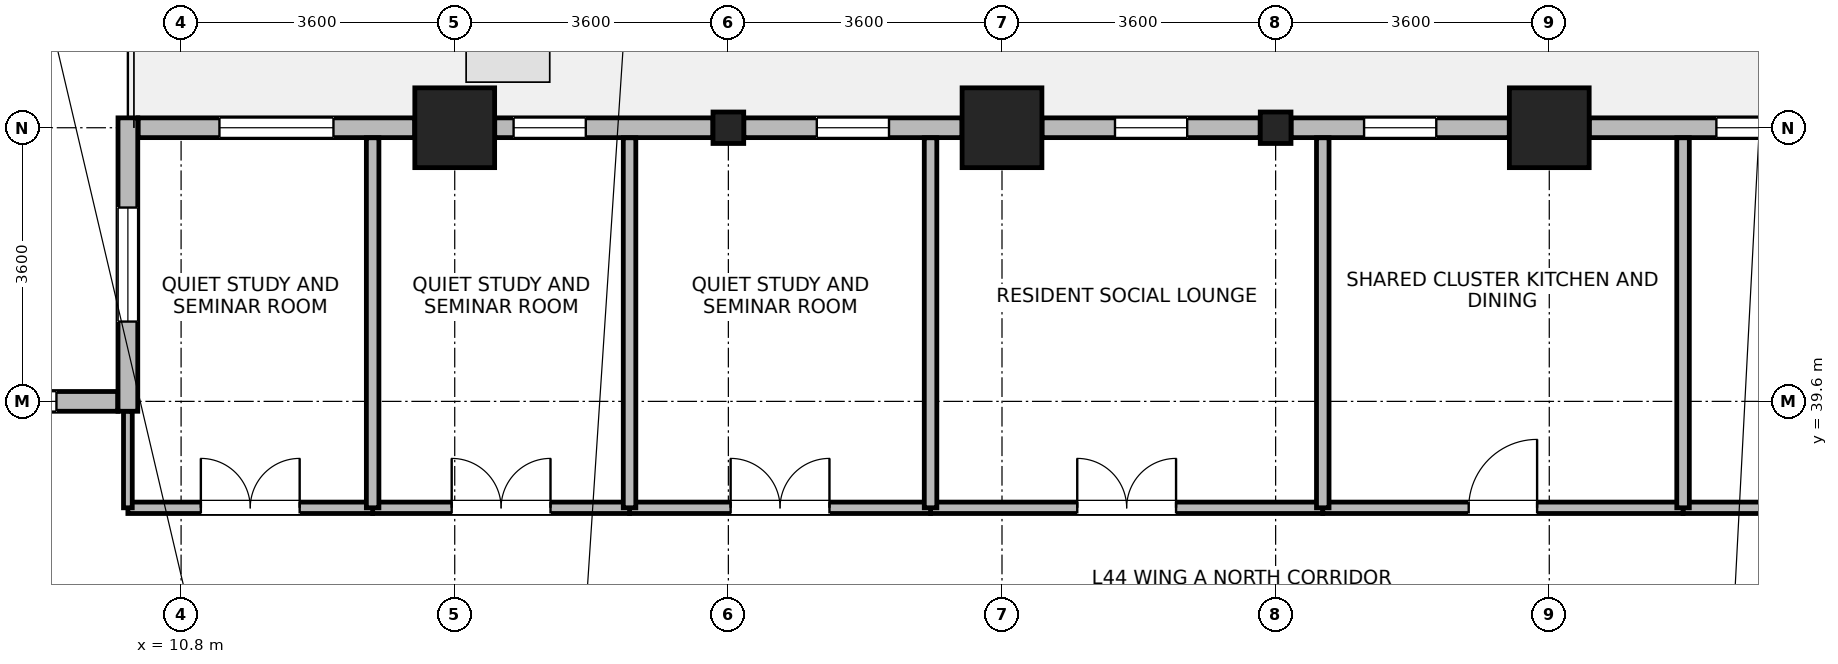
"""IFC4 building model, lengths in metres.
Left out: names, types, materials, properties, quantities, classifications, styles, units other than length and angle.
Written with IfcOpenShell. Run it as: python <this file> out.ifc"""

import sys

from ifc_helpers import new_model, si_unit, direction, frame, frame_2d, origin, origin_2d, place, context, subcontext, project, spatial, rectangle, i_section, extrude, source, transform, mapped, element, fill, save


model = new_model("IFC4")
c1 = context("Model", 3, precision=1e-05, world=origin(), true_north=direction((0.0, 1.0)))
c2 = subcontext(c1, "Body", "Model", "MODEL_VIEW")
j1 = project(units=[si_unit("LENGTHUNIT", "METRE"), si_unit("PLANEANGLEUNIT", "RADIAN")], contexts=[c1])
p1 = place(None, origin())
s1 = spatial("IfcSite", under=j1, at=p1, CompositionType="ELEMENT")
p2 = place(p1, origin())
s2 = spatial("IfcBuilding", under=s1, at=p2, CompositionType="ELEMENT")
p3 = place(p2, frame((0.0, 0.0, 173.5)))
s3 = spatial("IfcBuildingStorey", under=s2, at=p3, CompositionType="ELEMENT", Elevation=173.5)
m1 = source(origin(), c2, "Body", "SweptSolid", [
    extrude(rectangle(XDim=1.05, YDim=1.05, at=origin_2d()), origin(), (0.0, 0.0, 1.0), 3.7),
])
for number, where, z_axis, x_axis in (
    (1, (14.4, 43.2, 0.0), (0.0, 0.0, 1.0), (1.0, 0.0, 0.0)),
    (2, (21.6, 43.2, 0.0), (0.0, 0.0, 1.0), (1.0, 0.0, 0.0)),
    (3, (28.8, 43.2, 0.0), (0.0, 0.0, 1.0), (1.0, 0.0, 0.0)),
):
    element("IfcColumn", number, at=place(p3, frame(where, z_axis=z_axis, x_axis=x_axis)), inside=s3, PredefinedType="COLUMN", context=c2, shape_type="MappedRepresentation", body=[
        mapped(m1, transform((0.0, 0.0, 0.0), x_axis=(1.0, 0.0, 0.0), y_axis=(0.0, 1.0, 0.0), z_axis=(0.0, 0.0, 1.0), scale=1.0)),
    ])
m2 = source(origin(), c2, "Body", "SweptSolid", [
    extrude(i_section(OverallWidth=0.404, OverallDepth=0.414, WebThickness=0.021, FlangeThickness=0.028, FilletRadius=0.015, at=origin_2d()), origin(), (0.0, 0.0, 1.0), 3.7),
])
for number, where, z_axis, x_axis in (
    (4, (18.0, 43.2, 0.0), (0.0, 0.0, 1.0), (1.0, 0.0, 0.0)),
    (5, (25.2, 43.2, 0.0), (0.0, 0.0, 1.0), (1.0, 0.0, 0.0)),
):
    element("IfcColumn", number, at=place(p3, frame(where, z_axis=z_axis, x_axis=x_axis)), inside=s3, PredefinedType="COLUMN", context=c2, shape_type="MappedRepresentation", body=[
        mapped(m2, transform((0.0, 0.0, 0.0), x_axis=(1.0, 0.0, 0.0), y_axis=(0.0, 1.0, 0.0), z_axis=(0.0, 0.0, 1.0), scale=1.0)),
    ])
p4 = place(p3, frame((29.326, 43.2, 0.0), z_axis=(0.0, 0.0, 1.0), x_axis=(1.0, 0.0, 0.0)))
e6 = element("IfcWall", 6, at=p4, inside=s3, PredefinedType="STANDARD", context=c2, shape_type="SweptSolid", body=[
    extrude(rectangle(XDim=2.871, YDim=0.26, at=frame_2d((1.436, 0.0))), origin(), (0.0, 0.0, 1.0), 2.99),
])
p5 = place(p4, frame((1.673, 0.0, 0.85)))
e7 = element("IfcOpeningElement", 7, at=p5, cuts=e6, PredefinedType="OPENING", context=c2, shape_type="SweptSolid", body=[
    extrude(rectangle(XDim=0.95, YDim=1.75, at=frame_2d((0.475, 0.875))), frame((0.0, 0.14, 0.0), z_axis=(0.0, -1.0, 0.0), x_axis=(1.0, 0.0, 0.0)), (0.0, 0.0, 1.0), 0.28),
])
p6 = place(p3, frame((25.403, 43.2, 0.0), z_axis=(0.0, 0.0, 1.0), x_axis=(1.0, 0.0, 0.0)))
e8 = element("IfcWall", 8, at=p6, inside=s3, PredefinedType="STANDARD", context=c2, shape_type="SweptSolid", body=[
    extrude(rectangle(XDim=2.871, YDim=0.26, at=frame_2d((1.436, 0.0))), origin(), (0.0, 0.0, 1.0), 2.99),
])
p7 = place(p6, frame((0.96, 0.0, 0.85)))
e9 = element("IfcOpeningElement", 9, at=p7, cuts=e8, PredefinedType="OPENING", context=c2, shape_type="SweptSolid", body=[
    extrude(rectangle(XDim=0.95, YDim=1.75, at=frame_2d((0.475, 0.875))), frame((0.0, 0.14, 0.0), z_axis=(0.0, -1.0, 0.0), x_axis=(1.0, 0.0, 0.0)), (0.0, 0.0, 1.0), 0.28),
])
p8 = place(p3, frame((22.126, 43.2, 0.0), z_axis=(0.0, 0.0, 1.0), x_axis=(1.0, 0.0, 0.0)))
e10 = element("IfcWall", 10, at=p8, inside=s3, PredefinedType="STANDARD", context=c2, shape_type="SweptSolid", body=[
    extrude(rectangle(XDim=2.871, YDim=0.26, at=frame_2d((1.436, 0.0))), origin(), (0.0, 0.0, 1.0), 2.99),
])
p9 = place(p8, frame((0.96, 0.0, 0.85)))
e11 = element("IfcOpeningElement", 11, at=p9, cuts=e10, PredefinedType="OPENING", context=c2, shape_type="SweptSolid", body=[
    extrude(rectangle(XDim=0.95, YDim=1.75, at=frame_2d((0.475, 0.875))), frame((0.0, 0.14, 0.0), z_axis=(0.0, -1.0, 0.0), x_axis=(1.0, 0.0, 0.0)), (0.0, 0.0, 1.0), 0.28),
])
p10 = place(p3, frame((18.203, 43.2, 0.0), z_axis=(0.0, 0.0, 1.0), x_axis=(1.0, 0.0, 0.0)))
e12 = element("IfcWall", 12, at=p10, inside=s3, PredefinedType="STANDARD", context=c2, shape_type="SweptSolid", body=[
    extrude(rectangle(XDim=2.871, YDim=0.26, at=frame_2d((1.436, 0.0))), origin(), (0.0, 0.0, 1.0), 2.99),
])
p11 = place(p10, frame((0.96, 0.0, 0.85)))
e13 = element("IfcOpeningElement", 13, at=p11, cuts=e12, PredefinedType="OPENING", context=c2, shape_type="SweptSolid", body=[
    extrude(rectangle(XDim=0.95, YDim=1.75, at=frame_2d((0.475, 0.875))), frame((0.0, 0.14, 0.0), z_axis=(0.0, -1.0, 0.0), x_axis=(1.0, 0.0, 0.0)), (0.0, 0.0, 1.0), 0.28),
])
p12 = place(p3, frame((14.926, 43.2, 0.0), z_axis=(0.0, 0.0, 1.0), x_axis=(1.0, 0.0, 0.0)))
e14 = element("IfcWall", 14, at=p12, inside=s3, PredefinedType="STANDARD", context=c2, shape_type="SweptSolid", body=[
    extrude(rectangle(XDim=2.871, YDim=0.26, at=frame_2d((1.436, 0.0))), origin(), (0.0, 0.0, 1.0), 2.99),
])
p13 = place(p12, frame((0.249, 0.0, 0.85)))
e15 = element("IfcOpeningElement", 15, at=p13, cuts=e14, PredefinedType="OPENING", context=c2, shape_type="SweptSolid", body=[
    extrude(rectangle(XDim=0.95, YDim=1.75, at=frame_2d((0.475, 0.875))), frame((0.0, 0.14, 0.0), z_axis=(0.0, -1.0, 0.0), x_axis=(1.0, 0.0, 0.0)), (0.0, 0.0, 1.0), 0.28),
])
p14 = place(p3, frame((10.235, 43.2, 0.0), z_axis=(0.0, 0.0, 1.0), x_axis=(1.0, 0.0, 0.0)))
e16 = element("IfcWall", 16, at=p14, inside=s3, PredefinedType="STANDARD", context=c2, shape_type="SweptSolid", body=[
    extrude(rectangle(XDim=3.639, YDim=0.26, at=frame_2d((1.819, 0.0))), origin(), (0.0, 0.0, 1.0), 3.44),
])
p15 = place(p14, frame((1.07, 0.0, 0.85)))
e17 = element("IfcOpeningElement", 17, at=p15, cuts=e16, PredefinedType="OPENING", context=c2, shape_type="SweptSolid", body=[
    extrude(rectangle(XDim=1.5, YDim=1.85, at=frame_2d((0.75, 0.925))), frame((0.0, 0.14, 0.0), z_axis=(0.0, -1.0, 0.0), x_axis=(1.0, 0.0, 0.0)), (0.0, 0.0, 1.0), 0.28),
])
p16 = place(p3, frame((10.1, 39.47, 0.0), z_axis=(0.0, 0.0, 1.0), x_axis=(0.0, 1.0, 0.0)))
e18 = element("IfcWall", 18, at=p16, inside=s3, PredefinedType="STANDARD", context=c2, shape_type="SweptSolid", body=[
    extrude(rectangle(XDim=3.86, YDim=0.26, at=frame_2d((1.93, 0.0))), origin(), (0.0, 0.0, 1.0), 3.44),
])
p17 = place(p16, frame((1.18, 0.0, 0.85)))
e19 = element("IfcOpeningElement", 19, at=p17, cuts=e18, PredefinedType="OPENING", context=c2, shape_type="SweptSolid", body=[
    extrude(rectangle(XDim=1.5, YDim=1.85, at=frame_2d((0.75, 0.925))), frame((0.0, 0.14, 0.0), z_axis=(0.0, -1.0, 0.0), x_axis=(1.0, 0.0, 0.0)), (0.0, 0.0, 1.0), 0.28),
])
p18 = place(p3, frame((0.635, 39.6, 0.0), z_axis=(0.0, 0.0, 1.0), x_axis=(1.0, 0.0, 0.0)))
e20 = element("IfcWall", 20, at=p18, inside=s3, PredefinedType="STANDARD", context=c2, shape_type="SweptSolid", body=[
    extrude(rectangle(XDim=9.33, YDim=0.26, at=frame_2d((4.665, 0.0))), origin(), (0.0, 0.0, 1.0), 3.44),
])
p19 = place(p18, frame((0.805, 0.0, 0.85)))
e21 = element("IfcOpeningElement", 21, at=p19, cuts=e20, PredefinedType="OPENING", context=c2, shape_type="SweptSolid", body=[
    extrude(rectangle(XDim=1.5, YDim=1.85, at=frame_2d((0.75, 0.925))), frame((0.0, 0.14, 0.0), z_axis=(0.0, -1.0, 0.0), x_axis=(1.0, 0.0, 0.0)), (0.0, 0.0, 1.0), 0.28),
])
p20 = place(p18, frame((3.915, 0.0, 0.85)))
e22 = element("IfcOpeningElement", 22, at=p20, cuts=e20, PredefinedType="OPENING", context=c2, shape_type="SweptSolid", body=[
    extrude(rectangle(XDim=1.5, YDim=1.85, at=frame_2d((0.75, 0.925))), frame((0.0, 0.14, 0.0), z_axis=(0.0, -1.0, 0.0), x_axis=(1.0, 0.0, 0.0)), (0.0, 0.0, 1.0), 0.28),
])
p21 = place(p18, frame((7.025, 0.0, 0.85)))
e23 = element("IfcOpeningElement", 23, at=p21, cuts=e20, PredefinedType="OPENING", context=c2, shape_type="SweptSolid", body=[
    extrude(rectangle(XDim=1.5, YDim=1.85, at=frame_2d((0.75, 0.925))), frame((0.0, 0.14, 0.0), z_axis=(0.0, -1.0, 0.0), x_axis=(1.0, 0.0, 0.0)), (0.0, 0.0, 1.0), 0.28),
])
p22 = place(p3, frame((20.66, 38.2, 0.0), z_axis=(0.0, 0.0, 1.0), x_axis=(1.0, 0.0, 0.0)))
e24 = element("IfcWall", 24, at=p22, inside=s3, PredefinedType="PARTITIONING", context=c2, shape_type="SweptSolid", body=[
    extrude(rectangle(XDim=5.16, YDim=0.15, at=frame_2d((2.58, 0.0))), origin(), (0.0, 0.0, 1.0), 3.44),
])
p23 = place(p22, frame((1.93, 0.0, 0.0)))
e25 = element("IfcOpeningElement", 25, at=p23, cuts=e24, PredefinedType="OPENING", context=c2, shape_type="SweptSolid", body=[
    extrude(rectangle(XDim=1.3, YDim=2.12, at=frame_2d((0.65, 1.06))), frame((0.0, 0.085, 0.0), z_axis=(0.0, -1.0, 0.0), x_axis=(1.0, 0.0, 0.0)), (0.0, 0.0, 1.0), 0.17),
])
p24 = place(p3, frame((30.56, 38.2, 0.0), z_axis=(0.0, 0.0, 1.0), x_axis=(1.0, 0.0, 0.0)))
e26 = element("IfcWall", 26, at=p24, inside=s3, PredefinedType="PARTITIONING", context=c2, shape_type="SweptSolid", body=[
    extrude(rectangle(XDim=4.8, YDim=0.15, at=frame_2d((2.4, 0.0))), origin(), (0.0, 0.0, 1.0), 3.44),
])
p25 = place(p24, frame((1.75, 0.0, 0.0)))
e27 = element("IfcOpeningElement", 27, at=p25, cuts=e26, PredefinedType="OPENING", context=c2, shape_type="SweptSolid", body=[
    extrude(rectangle(XDim=1.3, YDim=2.12, at=frame_2d((0.65, 1.06))), frame((0.0, 0.085, 0.0), z_axis=(0.0, -1.0, 0.0), x_axis=(1.0, 0.0, 0.0)), (0.0, 0.0, 1.0), 0.17),
])
p26 = place(p3, frame((25.82, 38.2, 0.0), z_axis=(0.0, 0.0, 1.0), x_axis=(1.0, 0.0, 0.0)))
e28 = element("IfcWall", 28, at=p26, inside=s3, PredefinedType="PARTITIONING", context=c2, shape_type="SweptSolid", body=[
    extrude(rectangle(XDim=4.74, YDim=0.15, at=frame_2d((2.37, 0.0))), origin(), (0.0, 0.0, 1.0), 3.44),
])
p27 = place(p26, frame((1.92, 0.0, 0.0)))
e29 = element("IfcOpeningElement", 29, at=p27, cuts=e28, PredefinedType="OPENING", context=c2, shape_type="SweptSolid", body=[
    extrude(rectangle(XDim=0.9, YDim=2.08, at=frame_2d((0.45, 1.04))), frame((0.0, 0.085, 0.0), z_axis=(0.0, -1.0, 0.0), x_axis=(1.0, 0.0, 0.0)), (0.0, 0.0, 1.0), 0.17),
])
p28 = place(p3, frame((16.7, 38.2, 0.0), z_axis=(0.0, 0.0, 1.0), x_axis=(1.0, 0.0, 0.0)))
e30 = element("IfcWall", 30, at=p28, inside=s3, PredefinedType="PARTITIONING", context=c2, shape_type="SweptSolid", body=[
    extrude(rectangle(XDim=3.96, YDim=0.15, at=frame_2d((1.98, 0.0))), origin(), (0.0, 0.0, 1.0), 3.44),
])
p29 = place(p28, frame((1.33, 0.0, 0.0)))
e31 = element("IfcOpeningElement", 31, at=p29, cuts=e30, PredefinedType="OPENING", context=c2, shape_type="SweptSolid", body=[
    extrude(rectangle(XDim=1.3, YDim=2.12, at=frame_2d((0.65, 1.06))), frame((0.0, 0.085, 0.0), z_axis=(0.0, -1.0, 0.0), x_axis=(1.0, 0.0, 0.0)), (0.0, 0.0, 1.0), 0.17),
])
p30 = place(p3, frame((13.32, 38.2, 0.0), z_axis=(0.0, 0.0, 1.0), x_axis=(1.0, 0.0, 0.0)))
e32 = element("IfcWall", 32, at=p30, inside=s3, PredefinedType="PARTITIONING", context=c2, shape_type="SweptSolid", body=[
    extrude(rectangle(XDim=3.38, YDim=0.15, at=frame_2d((1.69, 0.0))), origin(), (0.0, 0.0, 1.0), 3.44),
])
p31 = place(p30, frame((1.04, 0.0, 0.0)))
e33 = element("IfcOpeningElement", 33, at=p31, cuts=e32, PredefinedType="OPENING", context=c2, shape_type="SweptSolid", body=[
    extrude(rectangle(XDim=1.3, YDim=2.12, at=frame_2d((0.65, 1.06))), frame((0.0, 0.085, 0.0), z_axis=(0.0, -1.0, 0.0), x_axis=(1.0, 0.0, 0.0)), (0.0, 0.0, 1.0), 0.17),
])
p32 = place(p3, frame((10.1, 38.2, 0.0), z_axis=(0.0, 0.0, 1.0), x_axis=(1.0, 0.0, 0.0)))
e34 = element("IfcWall", 34, at=p32, inside=s3, PredefinedType="PARTITIONING", context=c2, shape_type="SweptSolid", body=[
    extrude(rectangle(XDim=3.22, YDim=0.15, at=frame_2d((1.61, 0.0))), origin(), (0.0, 0.0, 1.0), 3.44),
])
p33 = place(p32, frame((0.96, 0.0, 0.0)))
e35 = element("IfcOpeningElement", 35, at=p33, cuts=e34, PredefinedType="OPENING", context=c2, shape_type="SweptSolid", body=[
    extrude(rectangle(XDim=1.3, YDim=2.12, at=frame_2d((0.65, 1.06))), frame((0.0, 0.085, 0.0), z_axis=(0.0, -1.0, 0.0), x_axis=(1.0, 0.0, 0.0)), (0.0, 0.0, 1.0), 0.17),
])
p34 = place(p3, frame((10.1, 38.2, 0.0), z_axis=(0.0, 0.0, 1.0), x_axis=(0.0, 1.0, 0.0)))
e36 = element("IfcWall", 36, at=p34, inside=s3, PredefinedType="PARTITIONING", context=c2, shape_type="SweptSolid", body=[
    extrude(rectangle(XDim=1.268, YDim=0.115, at=frame_2d((0.634, 0.0))), origin(), (0.0, 0.0, 1.0), 3.44),
])
for number, where, z_axis, x_axis in (
    (37, (13.32, 38.2, 0.0), (0.0, 0.0, 1.0), (0.0, 1.0, 0.0)),
    (38, (16.7, 38.2, 0.0), (0.0, 0.0, 1.0), (0.0, 1.0, 0.0)),
    (39, (20.66, 38.2, 0.0), (0.0, 0.0, 1.0), (0.0, 1.0, 0.0)),
    (40, (25.82, 38.2, 0.0), (0.0, 0.0, 1.0), (0.0, 1.0, 0.0)),
    (41, (30.56, 38.2, 0.0), (0.0, 0.0, 1.0), (0.0, 1.0, 0.0)),
):
    element("IfcWall", number, at=place(p3, frame(where, z_axis=z_axis, x_axis=x_axis)), inside=s3, PredefinedType="PARTITIONING", context=c2, shape_type="SweptSolid", body=[
        extrude(rectangle(XDim=4.868, YDim=0.165, at=frame_2d((2.434, 0.0))), origin(), (0.0, 0.0, 1.0), 3.44),
    ])
p35 = place(p5, origin())
e42 = element("IfcWindow", 42, at=p35, inside=s3, PartitioningType="SINGLE_PANEL", PredefinedType="WINDOW", context=c2, shape_type="SweptSolid", body=[
    extrude(rectangle(XDim=0.95, YDim=1.75, at=frame_2d((0.475, 0.875))), frame((0.0, 0.03, 0.0), z_axis=(0.0, -1.0, 0.0), x_axis=(1.0, 0.0, 0.0)), (0.0, 0.0, 1.0), 0.06),
])
fill(e7, e42)
p36 = place(p7, origin())
e43 = element("IfcWindow", 43, at=p36, inside=s3, PartitioningType="SINGLE_PANEL", PredefinedType="WINDOW", context=c2, shape_type="SweptSolid", body=[
    extrude(rectangle(XDim=0.95, YDim=1.75, at=frame_2d((0.475, 0.875))), frame((0.0, 0.03, 0.0), z_axis=(0.0, -1.0, 0.0), x_axis=(1.0, 0.0, 0.0)), (0.0, 0.0, 1.0), 0.06),
])
fill(e9, e43)
p37 = place(p9, origin())
e44 = element("IfcWindow", 44, at=p37, inside=s3, PartitioningType="SINGLE_PANEL", PredefinedType="WINDOW", context=c2, shape_type="SweptSolid", body=[
    extrude(rectangle(XDim=0.95, YDim=1.75, at=frame_2d((0.475, 0.875))), frame((0.0, 0.03, 0.0), z_axis=(0.0, -1.0, 0.0), x_axis=(1.0, 0.0, 0.0)), (0.0, 0.0, 1.0), 0.06),
])
fill(e11, e44)
p38 = place(p11, origin())
e45 = element("IfcWindow", 45, at=p38, inside=s3, PartitioningType="SINGLE_PANEL", PredefinedType="WINDOW", context=c2, shape_type="SweptSolid", body=[
    extrude(rectangle(XDim=0.95, YDim=1.75, at=frame_2d((0.475, 0.875))), frame((0.0, 0.03, 0.0), z_axis=(0.0, -1.0, 0.0), x_axis=(1.0, 0.0, 0.0)), (0.0, 0.0, 1.0), 0.06),
])
fill(e13, e45)
p39 = place(p13, origin())
e46 = element("IfcWindow", 46, at=p39, inside=s3, PartitioningType="SINGLE_PANEL", PredefinedType="WINDOW", context=c2, shape_type="SweptSolid", body=[
    extrude(rectangle(XDim=0.95, YDim=1.75, at=frame_2d((0.475, 0.875))), frame((0.0, 0.03, 0.0), z_axis=(0.0, -1.0, 0.0), x_axis=(1.0, 0.0, 0.0)), (0.0, 0.0, 1.0), 0.06),
])
fill(e15, e46)
p40 = place(p15, origin())
e47 = element("IfcWindow", 47, at=p40, inside=s3, PartitioningType="SINGLE_PANEL", PredefinedType="WINDOW", context=c2, shape_type="SweptSolid", body=[
    extrude(rectangle(XDim=1.5, YDim=1.85, at=frame_2d((0.75, 0.925))), frame((0.0, 0.03, 0.0), z_axis=(0.0, -1.0, 0.0), x_axis=(1.0, 0.0, 0.0)), (0.0, 0.0, 1.0), 0.06),
])
fill(e17, e47)
p41 = place(p17, origin())
e48 = element("IfcWindow", 48, at=p41, inside=s3, PartitioningType="SINGLE_PANEL", PredefinedType="WINDOW", context=c2, shape_type="SweptSolid", body=[
    extrude(rectangle(XDim=1.5, YDim=1.85, at=frame_2d((0.75, 0.925))), frame((0.0, 0.03, 0.0), z_axis=(0.0, -1.0, 0.0), x_axis=(1.0, 0.0, 0.0)), (0.0, 0.0, 1.0), 0.06),
])
fill(e19, e48)
p42 = place(p21, origin())
e49 = element("IfcWindow", 49, at=p42, inside=s3, PartitioningType="SINGLE_PANEL", PredefinedType="WINDOW", context=c2, shape_type="SweptSolid", body=[
    extrude(rectangle(XDim=1.5, YDim=1.85, at=frame_2d((0.75, 0.925))), frame((0.0, 0.03, 0.0), z_axis=(0.0, -1.0, 0.0), x_axis=(1.0, 0.0, 0.0)), (0.0, 0.0, 1.0), 0.06),
])
fill(e23, e49)
p43 = place(p23, origin())
e50 = element("IfcDoor", 50, at=p43, inside=s3, OperationType="DOUBLE_DOOR_SINGLE_SWING", PredefinedType="DOOR", context=c2, shape_type="SweptSolid", body=[
    extrude(rectangle(XDim=1.3, YDim=2.12, at=frame_2d((0.65, 1.06))), frame((0.0, 0.025, 0.0), z_axis=(0.0, -1.0, 0.0), x_axis=(1.0, 0.0, 0.0)), (0.0, 0.0, 1.0), 0.05),
])
fill(e25, e50)
p44 = place(p27, origin())
e51 = element("IfcDoor", 51, at=p44, inside=s3, OperationType="SINGLE_SWING_RIGHT", PredefinedType="DOOR", context=c2, shape_type="SweptSolid", body=[
    extrude(rectangle(XDim=0.9, YDim=2.08, at=frame_2d((0.45, 1.04))), frame((0.0, 0.025, 0.0), z_axis=(0.0, -1.0, 0.0), x_axis=(1.0, 0.0, 0.0)), (0.0, 0.0, 1.0), 0.05),
])
fill(e29, e51)
p45 = place(p29, origin())
e52 = element("IfcDoor", 52, at=p45, inside=s3, OperationType="DOUBLE_DOOR_SINGLE_SWING", PredefinedType="DOOR", context=c2, shape_type="SweptSolid", body=[
    extrude(rectangle(XDim=1.3, YDim=2.12, at=frame_2d((0.65, 1.06))), frame((0.0, 0.025, 0.0), z_axis=(0.0, -1.0, 0.0), x_axis=(1.0, 0.0, 0.0)), (0.0, 0.0, 1.0), 0.05),
])
fill(e31, e52)
p46 = place(p31, origin())
e53 = element("IfcDoor", 53, at=p46, inside=s3, OperationType="DOUBLE_DOOR_SINGLE_SWING", PredefinedType="DOOR", context=c2, shape_type="SweptSolid", body=[
    extrude(rectangle(XDim=1.3, YDim=2.12, at=frame_2d((0.65, 1.06))), frame((0.0, 0.025, 0.0), z_axis=(0.0, -1.0, 0.0), x_axis=(1.0, 0.0, 0.0)), (0.0, 0.0, 1.0), 0.05),
])
fill(e33, e53)
p47 = place(p33, origin())
e54 = element("IfcDoor", 54, at=p47, inside=s3, OperationType="DOUBLE_DOOR_SINGLE_SWING", PredefinedType="DOOR", context=c2, shape_type="SweptSolid", body=[
    extrude(rectangle(XDim=1.3, YDim=2.12, at=frame_2d((0.65, 1.06))), frame((0.0, 0.025, 0.0), z_axis=(0.0, -1.0, 0.0), x_axis=(1.0, 0.0, 0.0)), (0.0, 0.0, 1.0), 0.05),
])
fill(e35, e54)
save(model, sys.argv[1])
